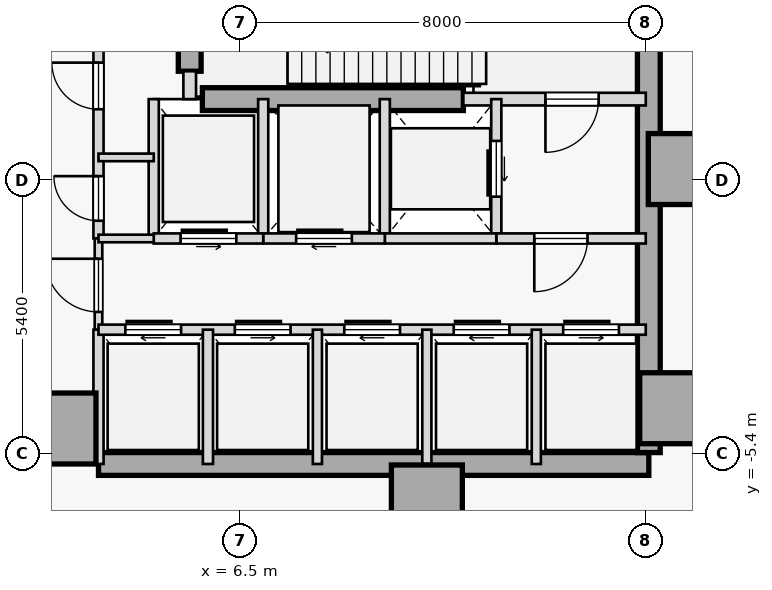
"""IFC4 building model, lengths in metres.
Left out: names, types, materials, properties, quantities, classifications, styles, units other than length and angle.
Written with IfcOpenShell. Run it as: python <this file> out.ifc"""

import sys

from ifc_helpers import new_model, si_unit, direction, frame, frame_2d, origin, origin_2d, place, context, subcontext, project, spatial, rectangle, extrude, element, fill, save


model = new_model("IFC4")
c1 = context("Model", 3, precision=1e-05, world=origin(), true_north=direction((0.0, 1.0)))
c2 = subcontext(c1, "Body", "Model", "MODEL_VIEW")
j1 = project(units=[si_unit("LENGTHUNIT", "METRE"), si_unit("PLANEANGLEUNIT", "RADIAN")], contexts=[c1])
p1 = place(None, origin())
s1 = spatial("IfcSite", under=j1, at=p1, CompositionType="ELEMENT")
p2 = place(p1, origin())
s2 = spatial("IfcBuilding", under=s1, at=p2, CompositionType="ELEMENT")
p3 = place(p2, origin())
s3 = spatial("IfcBuildingStorey", under=s2, at=p3, CompositionType="ELEMENT", Elevation=0.0)
for number, where, z_axis, x_axis in (
    (1, (15.25, 0.22, 0.0), (0.0, 0.0, 1.0), (1.0, 0.0, 0.0)),
    (2, (15.08, -4.5, 0.0), (0.0, 0.0, 1.0), (1.0, 0.0, 0.0)),
    (3, (10.18, -6.32, 0.0), (0.0, 0.0, 1.0), (1.0, 0.0, 0.0)),
    (4, (2.95, -4.9, 0.0), (0.0, 0.0, 1.0), (1.0, 0.0, 0.0)),
):
    element("IfcColumn", number, at=place(p3, frame(where, z_axis=z_axis, x_axis=x_axis)), inside=s3, PredefinedType="COLUMN", context=c2, shape_type="SweptSolid", body=[
        extrude(rectangle(XDim=1.4, YDim=1.4, at=origin_2d()), origin(), (0.0, 0.0, 1.0), 9.6),
    ])
p4 = place(p3, frame((3.7, -5.6, 0.0), z_axis=(0.0, 0.0, 1.0), x_axis=(1.0, 0.0, 0.0)))
e5 = element("IfcWall", 5, at=p4, inside=s3, PredefinedType="SHEAR", context=c2, shape_type="SweptSolid", body=[
    extrude(rectangle(XDim=10.86, YDim=0.45, at=frame_2d((5.43, 0.0))), origin(), (0.0, 0.0, 1.0), 9.2),
])
p5 = place(p3, frame((14.56, -5.375, 0.0), z_axis=(0.0, 0.0, 1.0), x_axis=(0.0, 1.0, 0.0)))
e6 = element("IfcWall", 6, at=p5, inside=s3, PredefinedType="SHEAR", context=c2, shape_type="SweptSolid", body=[
    extrude(rectangle(XDim=10.75, YDim=0.45, at=frame_2d((5.375, 0.0))), origin(), (0.0, 0.0, 1.0), 9.2),
])
p6 = place(p3, frame((5.5, 2.15, 0.0), z_axis=(0.0, 0.0, 1.0), x_axis=(0.0, 1.0, 0.0)))
e7 = element("IfcWall", 7, at=p6, inside=s3, PredefinedType="SHEAR", context=c2, shape_type="SweptSolid", body=[
    extrude(rectangle(XDim=3.225, YDim=0.45, at=frame_2d((1.613, 0.0))), origin(), (0.0, 0.0, 1.0), 9.2),
])
p7 = place(p3, frame((5.75, 1.6, 0.0), z_axis=(0.0, 0.0, 1.0), x_axis=(1.0, 0.0, 0.0)))
e8 = element("IfcWall", 8, at=p7, inside=s3, PredefinedType="SHEAR", context=c2, shape_type="SweptSolid", body=[
    extrude(rectangle(XDim=5.15, YDim=0.45, at=frame_2d((2.575, 0.0))), origin(), (0.0, 0.0, 1.0), 9.2),
])
p8 = place(p3, frame((10.9, 1.6, 0.0), z_axis=(0.0, 0.0, 1.0), x_axis=(1.0, 0.0, 0.0)))
e9 = element("IfcWall", 9, at=p8, inside=s3, PredefinedType="STANDARD", context=c2, shape_type="SweptSolid", body=[
    extrude(rectangle(XDim=3.6, YDim=0.25, at=frame_2d((1.8, 0.0))), origin(), (0.0, 0.0, 1.0), 9.2),
])
p9 = place(p8, frame((1.62, 0.0, 0.0)))
e10 = element("IfcOpeningElement", 10, at=p9, cuts=e9, PredefinedType="OPENING", context=c2, shape_type="SweptSolid", body=[
    extrude(rectangle(XDim=1.05, YDim=2.15, at=frame_2d((0.525, 1.075))), frame((0.0, 0.135, 0.0), z_axis=(0.0, -1.0, 0.0), x_axis=(1.0, 0.0, 0.0)), (0.0, 0.0, 1.0), 0.27),
])
p10 = place(p3, frame((5.5, 1.6, 0.0), z_axis=(0.0, 0.0, 1.0), x_axis=(0.0, 1.0, 0.0)))
e11 = element("IfcWall", 11, at=p10, inside=s3, PredefinedType="STANDARD", context=c2, shape_type="SweptSolid", body=[
    extrude(rectangle(XDim=0.55, YDim=0.25, at=frame_2d((0.275, 0.0))), origin(), (0.0, 0.0, 1.0), 9.2),
])
p11 = place(p3, frame((3.7, -1.15, 0.0), z_axis=(0.0, 0.0, 1.0), x_axis=(0.0, 1.0, 0.0)))
e12 = element("IfcWall", 12, at=p11, inside=s3, PredefinedType="STANDARD", context=c2, shape_type="SweptSolid", body=[
    extrude(rectangle(XDim=6.75, YDim=0.2, at=frame_2d((3.375, 0.0))), origin(), (0.0, 0.0, 1.0), 9.2),
])
p12 = place(p11, frame((0.35, 0.0, 0.0)))
e13 = element("IfcOpeningElement", 13, at=p12, cuts=e12, PredefinedType="OPENING", context=c2, shape_type="SweptSolid", body=[
    extrude(rectangle(XDim=0.88, YDim=2.15, at=frame_2d((0.44, 1.075))), frame((0.0, 0.11, 0.0), z_axis=(0.0, -1.0, 0.0), x_axis=(1.0, 0.0, 0.0)), (0.0, 0.0, 1.0), 0.22),
])
p13 = place(p11, frame((2.55, 0.0, 0.0)))
e14 = element("IfcOpeningElement", 14, at=p13, cuts=e12, PredefinedType="OPENING", context=c2, shape_type="SweptSolid", body=[
    extrude(rectangle(XDim=0.92, YDim=2.15, at=frame_2d((0.46, 1.075))), frame((0.0, 0.11, 0.0), z_axis=(0.0, -1.0, 0.0), x_axis=(1.0, 0.0, 0.0)), (0.0, 0.0, 1.0), 0.22),
])
p14 = place(p11, frame((4.22, 0.0, 0.0)))
e15 = element("IfcOpeningElement", 15, at=p14, cuts=e12, PredefinedType="OPENING", context=c2, shape_type="SweptSolid", body=[
    extrude(rectangle(XDim=0.88, YDim=2.15, at=frame_2d((0.44, 1.075))), frame((0.0, 0.11, 0.0), z_axis=(0.0, -1.0, 0.0), x_axis=(1.0, 0.0, 0.0)), (0.0, 0.0, 1.0), 0.22),
])
p15 = place(p3, frame((3.7, -2.95, 0.0), z_axis=(0.0, 0.0, 1.0), x_axis=(0.0, 1.0, 0.0)))
e16 = element("IfcWall", 16, at=p15, inside=s3, PredefinedType="PARTITIONING", context=c2, shape_type="SweptSolid", body=[
    extrude(rectangle(XDim=1.8, YDim=0.15, at=frame_2d((0.9, 0.0))), origin(), (0.0, 0.0, 1.0), 9.2),
])
p16 = place(p15, frame((0.35, 0.0, 0.0)))
e17 = element("IfcOpeningElement", 17, at=p16, cuts=e16, PredefinedType="OPENING", context=c2, shape_type="SweptSolid", body=[
    extrude(rectangle(XDim=1.05, YDim=2.18, at=frame_2d((0.525, 1.09))), frame((0.0, 0.085, 0.0), z_axis=(0.0, -1.0, 0.0), x_axis=(1.0, 0.0, 0.0)), (0.0, 0.0, 1.0), 0.17),
])
p17 = place(p3, frame((3.7, -5.6, 0.0), z_axis=(0.0, 0.0, 1.0), x_axis=(0.0, 1.0, 0.0)))
e18 = element("IfcWall", 18, at=p17, inside=s3, PredefinedType="STANDARD", context=c2, shape_type="SweptSolid", body=[
    extrude(rectangle(XDim=2.65, YDim=0.2, at=frame_2d((1.325, 0.0))), origin(), (0.0, 0.0, 1.0), 9.2),
])
p18 = place(p3, frame((11.55, -1.15, 0.0), z_axis=(0.0, 0.0, 1.0), x_axis=(0.0, 1.0, 0.0)))
e19 = element("IfcWall", 19, at=p18, inside=s3, PredefinedType="STANDARD", context=c2, shape_type="SweptSolid", body=[
    extrude(rectangle(XDim=2.75, YDim=0.2, at=frame_2d((1.375, 0.0))), origin(), (0.0, 0.0, 1.0), 9.2),
])
p19 = place(p18, frame((0.825, 0.0, 0.0)))
e20 = element("IfcOpeningElement", 20, at=p19, cuts=e19, PredefinedType="OPENING", context=c2, shape_type="SweptSolid", body=[
    extrude(rectangle(XDim=1.1, YDim=2.15, at=frame_2d((0.55, 1.075))), frame((0.0, 0.11, 0.0), z_axis=(0.0, -1.0, 0.0), x_axis=(1.0, 0.0, 0.0)), (0.0, 0.0, 1.0), 0.22),
])
p20 = place(p3, frame((9.35, -1.15, 0.0), z_axis=(0.0, 0.0, 1.0), x_axis=(0.0, 1.0, 0.0)))
e21 = element("IfcWall", 21, at=p20, inside=s3, PredefinedType="STANDARD", context=c2, shape_type="SweptSolid", body=[
    extrude(rectangle(XDim=2.75, YDim=0.2, at=frame_2d((1.375, 0.0))), origin(), (0.0, 0.0, 1.0), 9.2),
])
p21 = place(p3, frame((11.55, -1.15, 0.0), z_axis=(0.0, 0.0, 1.0), x_axis=(1.0, 0.0, 0.0)))
e22 = element("IfcWall", 22, at=p21, inside=s3, PredefinedType="STANDARD", context=c2, shape_type="SweptSolid", body=[
    extrude(rectangle(XDim=2.95, YDim=0.2, at=frame_2d((1.475, 0.0))), origin(), (0.0, 0.0, 1.0), 9.2),
])
p22 = place(p21, frame((0.75, 0.0, 0.0)))
e23 = element("IfcOpeningElement", 23, at=p22, cuts=e22, PredefinedType="OPENING", context=c2, shape_type="SweptSolid", body=[
    extrude(rectangle(XDim=1.05, YDim=2.18, at=frame_2d((0.525, 1.09))), frame((0.0, 0.11, 0.0), z_axis=(0.0, -1.0, 0.0), x_axis=(1.0, 0.0, 0.0)), (0.0, 0.0, 1.0), 0.22),
])
p23 = place(p3, frame((9.35, -1.15, 0.0), z_axis=(0.0, 0.0, 1.0), x_axis=(1.0, 0.0, 0.0)))
e24 = element("IfcWall", 24, at=p23, inside=s3, PredefinedType="STANDARD", context=c2, shape_type="SweptSolid", body=[
    extrude(rectangle(XDim=2.2, YDim=0.2, at=frame_2d((1.1, 0.0))), origin(), (0.0, 0.0, 1.0), 9.2),
])
p24 = place(p3, frame((6.95, -1.15, 0.0), z_axis=(0.0, 0.0, 1.0), x_axis=(0.0, 1.0, 0.0)))
e25 = element("IfcWall", 25, at=p24, inside=s3, PredefinedType="STANDARD", context=c2, shape_type="SweptSolid", body=[
    extrude(rectangle(XDim=2.75, YDim=0.2, at=frame_2d((1.375, 0.0))), origin(), (0.0, 0.0, 1.0), 9.2),
])
p25 = place(p3, frame((6.95, -1.15, 0.0), z_axis=(0.0, 0.0, 1.0), x_axis=(1.0, 0.0, 0.0)))
e26 = element("IfcWall", 26, at=p25, inside=s3, PredefinedType="STANDARD", context=c2, shape_type="SweptSolid", body=[
    extrude(rectangle(XDim=2.4, YDim=0.2, at=frame_2d((1.2, 0.0))), origin(), (0.0, 0.0, 1.0), 9.2),
])
p26 = place(p25, frame((0.65, 0.0, 0.0)))
e27 = element("IfcOpeningElement", 27, at=p26, cuts=e26, PredefinedType="OPENING", context=c2, shape_type="SweptSolid", body=[
    extrude(rectangle(XDim=1.1, YDim=2.15, at=frame_2d((0.55, 1.075))), frame((0.0, 0.11, 0.0), z_axis=(0.0, -1.0, 0.0), x_axis=(1.0, 0.0, 0.0)), (0.0, 0.0, 1.0), 0.22),
])
p27 = place(p3, frame((4.79, -1.15, 0.0), z_axis=(0.0, 0.0, 1.0), x_axis=(0.0, 1.0, 0.0)))
e28 = element("IfcWall", 28, at=p27, inside=s3, PredefinedType="STANDARD", context=c2, shape_type="SweptSolid", body=[
    extrude(rectangle(XDim=2.75, YDim=0.2, at=frame_2d((1.375, 0.0))), origin(), (0.0, 0.0, 1.0), 9.2),
])
p28 = place(p3, frame((4.79, -1.15, 0.0), z_axis=(0.0, 0.0, 1.0), x_axis=(1.0, 0.0, 0.0)))
e29 = element("IfcWall", 29, at=p28, inside=s3, PredefinedType="STANDARD", context=c2, shape_type="SweptSolid", body=[
    extrude(rectangle(XDim=2.16, YDim=0.2, at=frame_2d((1.08, 0.0))), origin(), (0.0, 0.0, 1.0), 9.2),
])
p29 = place(p28, frame((0.53, 0.0, 0.0)))
e30 = element("IfcOpeningElement", 30, at=p29, cuts=e29, PredefinedType="OPENING", context=c2, shape_type="SweptSolid", body=[
    extrude(rectangle(XDim=1.1, YDim=2.15, at=frame_2d((0.55, 1.075))), frame((0.0, 0.11, 0.0), z_axis=(0.0, -1.0, 0.0), x_axis=(1.0, 0.0, 0.0)), (0.0, 0.0, 1.0), 0.22),
])
p30 = place(p3, frame((3.7, -1.15, 0.0), z_axis=(0.0, 0.0, 1.0), x_axis=(1.0, 0.0, 0.0)))
e31 = element("IfcWall", 31, at=p30, inside=s3, PredefinedType="PARTITIONING", context=c2, shape_type="SweptSolid", body=[
    extrude(rectangle(XDim=1.09, YDim=0.15, at=frame_2d((0.545, 0.0))), origin(), (0.0, 0.0, 1.0), 9.2),
])
p31 = place(p3, frame((3.7, -2.95, 0.0), z_axis=(0.0, 0.0, 1.0), x_axis=(1.0, 0.0, 0.0)))
e32 = element("IfcWall", 32, at=p31, inside=s3, PredefinedType="STANDARD", context=c2, shape_type="SweptSolid", body=[
    extrude(rectangle(XDim=10.8, YDim=0.2, at=frame_2d((5.4, 0.0))), origin(), (0.0, 0.0, 1.0), 9.2),
])
p32 = place(p31, frame((0.53, 0.0, 0.0)))
e33 = element("IfcOpeningElement", 33, at=p32, cuts=e32, PredefinedType="OPENING", context=c2, shape_type="SweptSolid", body=[
    extrude(rectangle(XDim=1.1, YDim=2.15, at=frame_2d((0.55, 1.075))), frame((0.0, 0.11, 0.0), z_axis=(0.0, -1.0, 0.0), x_axis=(1.0, 0.0, 0.0)), (0.0, 0.0, 1.0), 0.22),
])
p33 = place(p31, frame((2.69, 0.0, 0.0)))
e34 = element("IfcOpeningElement", 34, at=p33, cuts=e32, PredefinedType="OPENING", context=c2, shape_type="SweptSolid", body=[
    extrude(rectangle(XDim=1.1, YDim=2.15, at=frame_2d((0.55, 1.075))), frame((0.0, 0.11, 0.0), z_axis=(0.0, -1.0, 0.0), x_axis=(1.0, 0.0, 0.0)), (0.0, 0.0, 1.0), 0.22),
])
p34 = place(p31, frame((4.85, 0.0, 0.0)))
e35 = element("IfcOpeningElement", 35, at=p34, cuts=e32, PredefinedType="OPENING", context=c2, shape_type="SweptSolid", body=[
    extrude(rectangle(XDim=1.1, YDim=2.15, at=frame_2d((0.55, 1.075))), frame((0.0, 0.11, 0.0), z_axis=(0.0, -1.0, 0.0), x_axis=(1.0, 0.0, 0.0)), (0.0, 0.0, 1.0), 0.22),
])
p35 = place(p31, frame((7.01, 0.0, 0.0)))
e36 = element("IfcOpeningElement", 36, at=p35, cuts=e32, PredefinedType="OPENING", context=c2, shape_type="SweptSolid", body=[
    extrude(rectangle(XDim=1.1, YDim=2.15, at=frame_2d((0.55, 1.075))), frame((0.0, 0.11, 0.0), z_axis=(0.0, -1.0, 0.0), x_axis=(1.0, 0.0, 0.0)), (0.0, 0.0, 1.0), 0.22),
])
p36 = place(p31, frame((9.17, 0.0, 0.0)))
e37 = element("IfcOpeningElement", 37, at=p36, cuts=e32, PredefinedType="OPENING", context=c2, shape_type="SweptSolid", body=[
    extrude(rectangle(XDim=1.1, YDim=2.15, at=frame_2d((0.55, 1.075))), frame((0.0, 0.11, 0.0), z_axis=(0.0, -1.0, 0.0), x_axis=(1.0, 0.0, 0.0)), (0.0, 0.0, 1.0), 0.22),
])
p37 = place(p3, frame((5.86, -5.6, 0.0), z_axis=(0.0, 0.0, 1.0), x_axis=(0.0, 1.0, 0.0)))
e38 = element("IfcWall", 38, at=p37, inside=s3, PredefinedType="STANDARD", context=c2, shape_type="SweptSolid", body=[
    extrude(rectangle(XDim=2.65, YDim=0.2, at=frame_2d((1.325, 0.0))), origin(), (0.0, 0.0, 1.0), 9.2),
])
for number, where, z_axis, x_axis in (
    (39, (12.34, -5.6, 0.0), (0.0, 0.0, 1.0), (0.0, 1.0, 0.0)),
    (40, (10.18, -5.6, 0.0), (0.0, 0.0, 1.0), (0.0, 1.0, 0.0)),
    (41, (8.02, -5.6, 0.0), (0.0, 0.0, 1.0), (0.0, 1.0, 0.0)),
):
    element("IfcWall", number, at=place(p3, frame(where, z_axis=z_axis, x_axis=x_axis)), inside=s3, PredefinedType="STANDARD", context=c2, shape_type="SweptSolid", body=[
        extrude(rectangle(XDim=2.65, YDim=0.18, at=frame_2d((1.325, 0.0))), origin(), (0.0, 0.0, 1.0), 9.2),
    ])
p38 = place(p3, frame((3.7, 0.45, 0.0), z_axis=(0.0, 0.0, 1.0), x_axis=(1.0, 0.0, 0.0)))
e42 = element("IfcWall", 42, at=p38, inside=s3, PredefinedType="PARTITIONING", context=c2, shape_type="SweptSolid", body=[
    extrude(rectangle(XDim=1.09, YDim=0.15, at=frame_2d((0.545, 0.0))), origin(), (0.0, 0.0, 1.0), 9.2),
])
p39 = place(p9, frame((1.05, 0.0, 0.0), z_axis=(0.0, 0.0, 1.0), x_axis=(-1.0, 0.0, 0.0)))
e43 = element("IfcDoor", 43, at=p39, inside=s3, OperationType="SINGLE_SWING_LEFT", PredefinedType="DOOR", context=c2, shape_type="SweptSolid", body=[
    extrude(rectangle(XDim=1.05, YDim=2.15, at=frame_2d((0.525, 1.075))), frame((0.0, 0.025, 0.0), z_axis=(0.0, -1.0, 0.0), x_axis=(1.0, 0.0, 0.0)), (0.0, 0.0, 1.0), 0.05),
])
fill(e10, e43)
p40 = place(p22, frame((1.05, 0.0, 0.0), z_axis=(0.0, 0.0, 1.0), x_axis=(-1.0, 0.0, 0.0)))
e44 = element("IfcDoor", 44, at=p40, inside=s3, OperationType="SINGLE_SWING_LEFT", PredefinedType="DOOR", context=c2, shape_type="SweptSolid", body=[
    extrude(rectangle(XDim=1.05, YDim=2.18, at=frame_2d((0.525, 1.09))), frame((0.0, 0.025, 0.0), z_axis=(0.0, -1.0, 0.0), x_axis=(1.0, 0.0, 0.0)), (0.0, 0.0, 1.0), 0.05),
])
fill(e23, e44)
p41 = place(p16, origin())
e45 = element("IfcDoor", 45, at=p41, inside=s3, OperationType="SINGLE_SWING_RIGHT", PredefinedType="DOOR", context=c2, shape_type="SweptSolid", body=[
    extrude(rectangle(XDim=1.05, YDim=2.18, at=frame_2d((0.525, 1.09))), frame((0.0, 0.025, 0.0), z_axis=(0.0, -1.0, 0.0), x_axis=(1.0, 0.0, 0.0)), (0.0, 0.0, 1.0), 0.05),
])
fill(e17, e45)
p42 = place(p19, origin())
e46 = element("IfcDoor", 46, at=p42, inside=s3, OperationType="SLIDING_TO_RIGHT", PredefinedType="DOOR", context=c2, shape_type="SweptSolid", body=[
    extrude(rectangle(XDim=1.1, YDim=2.15, at=frame_2d((0.55, 1.075))), frame((0.0, 0.025, 0.0), z_axis=(0.0, -1.0, 0.0), x_axis=(1.0, 0.0, 0.0)), (0.0, 0.0, 1.0), 0.05),
])
fill(e20, e46)
p43 = place(p26, origin())
e47 = element("IfcDoor", 47, at=p43, inside=s3, OperationType="SLIDING_TO_RIGHT", PredefinedType="DOOR", context=c2, shape_type="SweptSolid", body=[
    extrude(rectangle(XDim=1.1, YDim=2.15, at=frame_2d((0.55, 1.075))), frame((0.0, 0.025, 0.0), z_axis=(0.0, -1.0, 0.0), x_axis=(1.0, 0.0, 0.0)), (0.0, 0.0, 1.0), 0.05),
])
fill(e27, e47)
p44 = place(p29, origin())
e48 = element("IfcDoor", 48, at=p44, inside=s3, OperationType="SLIDING_TO_LEFT", PredefinedType="DOOR", context=c2, shape_type="SweptSolid", body=[
    extrude(rectangle(XDim=1.1, YDim=2.15, at=frame_2d((0.55, 1.075))), frame((0.0, 0.025, 0.0), z_axis=(0.0, -1.0, 0.0), x_axis=(1.0, 0.0, 0.0)), (0.0, 0.0, 1.0), 0.05),
])
fill(e30, e48)
p45 = place(p32, origin())
e49 = element("IfcDoor", 49, at=p45, inside=s3, OperationType="SLIDING_TO_RIGHT", PredefinedType="DOOR", context=c2, shape_type="SweptSolid", body=[
    extrude(rectangle(XDim=1.1, YDim=2.15, at=frame_2d((0.55, 1.075))), frame((0.0, 0.025, 0.0), z_axis=(0.0, -1.0, 0.0), x_axis=(1.0, 0.0, 0.0)), (0.0, 0.0, 1.0), 0.05),
])
fill(e33, e49)
p46 = place(p33, origin())
e50 = element("IfcDoor", 50, at=p46, inside=s3, OperationType="SLIDING_TO_LEFT", PredefinedType="DOOR", context=c2, shape_type="SweptSolid", body=[
    extrude(rectangle(XDim=1.1, YDim=2.15, at=frame_2d((0.55, 1.075))), frame((0.0, 0.025, 0.0), z_axis=(0.0, -1.0, 0.0), x_axis=(1.0, 0.0, 0.0)), (0.0, 0.0, 1.0), 0.05),
])
fill(e34, e50)
p47 = place(p34, origin())
e51 = element("IfcDoor", 51, at=p47, inside=s3, OperationType="SLIDING_TO_RIGHT", PredefinedType="DOOR", context=c2, shape_type="SweptSolid", body=[
    extrude(rectangle(XDim=1.1, YDim=2.15, at=frame_2d((0.55, 1.075))), frame((0.0, 0.025, 0.0), z_axis=(0.0, -1.0, 0.0), x_axis=(1.0, 0.0, 0.0)), (0.0, 0.0, 1.0), 0.05),
])
fill(e35, e51)
p48 = place(p35, origin())
e52 = element("IfcDoor", 52, at=p48, inside=s3, OperationType="SLIDING_TO_RIGHT", PredefinedType="DOOR", context=c2, shape_type="SweptSolid", body=[
    extrude(rectangle(XDim=1.1, YDim=2.15, at=frame_2d((0.55, 1.075))), frame((0.0, 0.025, 0.0), z_axis=(0.0, -1.0, 0.0), x_axis=(1.0, 0.0, 0.0)), (0.0, 0.0, 1.0), 0.05),
])
fill(e36, e52)
p49 = place(p36, origin())
e53 = element("IfcDoor", 53, at=p49, inside=s3, OperationType="SLIDING_TO_LEFT", PredefinedType="DOOR", context=c2, shape_type="SweptSolid", body=[
    extrude(rectangle(XDim=1.1, YDim=2.15, at=frame_2d((0.55, 1.075))), frame((0.0, 0.025, 0.0), z_axis=(0.0, -1.0, 0.0), x_axis=(1.0, 0.0, 0.0)), (0.0, 0.0, 1.0), 0.05),
])
fill(e37, e53)
p50 = place(p12, origin())
e54 = element("IfcDoor", 54, at=p50, inside=s3, OperationType="SINGLE_SWING_RIGHT", PredefinedType="DOOR", context=c2, shape_type="SweptSolid", body=[
    extrude(rectangle(XDim=0.88, YDim=2.15, at=frame_2d((0.44, 1.075))), frame((0.0, 0.025, 0.0), z_axis=(0.0, -1.0, 0.0), x_axis=(1.0, 0.0, 0.0)), (0.0, 0.0, 1.0), 0.05),
])
fill(e13, e54)
p51 = place(p13, origin())
e55 = element("IfcDoor", 55, at=p51, inside=s3, OperationType="SINGLE_SWING_RIGHT", PredefinedType="DOOR", context=c2, shape_type="SweptSolid", body=[
    extrude(rectangle(XDim=0.92, YDim=2.15, at=frame_2d((0.46, 1.075))), frame((0.0, 0.025, 0.0), z_axis=(0.0, -1.0, 0.0), x_axis=(1.0, 0.0, 0.0)), (0.0, 0.0, 1.0), 0.05),
])
fill(e14, e55)
save(model, sys.argv[1])
